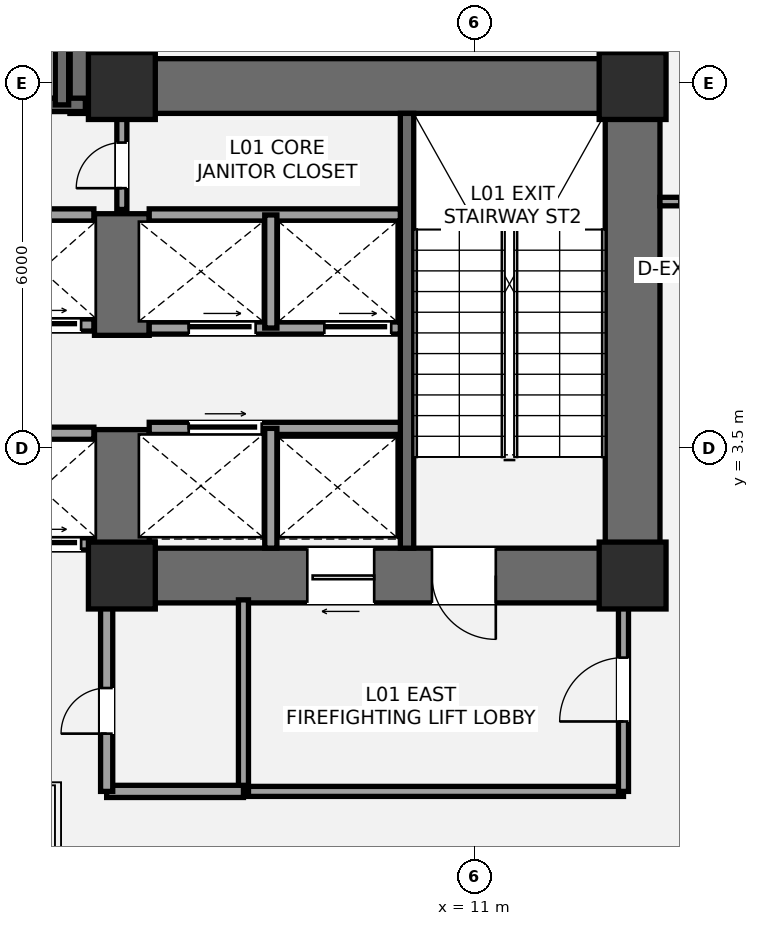
"""IFC4 building model, lengths in metres.
Left out: names, types, materials, properties, quantities, classifications, styles, units other than length and angle.
Written with IfcOpenShell. Run it as: python <this file> out.ifc"""

import sys

from ifc_helpers import new_model, si_unit, direction, frame, frame_2d, origin, origin_2d, place, context, subcontext, project, spatial, rectangle, extrude, element, fill, save


model = new_model("IFC4")
c1 = context("Model", 3, precision=1e-05, world=origin(), true_north=direction((0.0, 1.0)))
c2 = subcontext(c1, "Body", "Model", "MODEL_VIEW")
j1 = project(units=[si_unit("LENGTHUNIT", "METRE"), si_unit("PLANEANGLEUNIT", "RADIAN")], contexts=[c1])
p1 = place(None, origin())
s1 = spatial("IfcSite", under=j1, at=p1, CompositionType="ELEMENT")
p2 = place(p1, origin())
s2 = spatial("IfcBuilding", under=s1, at=p2, CompositionType="ELEMENT")
p3 = place(p2, frame((0.0, 0.0, 6.0)))
s3 = spatial("IfcBuildingStorey", under=s2, at=p3, CompositionType="ELEMENT", Elevation=6.0)
p4 = place(p3, frame((13.6, 0.95, 0.0), z_axis=(0.0, 0.0, 1.0), x_axis=(0.0, 1.0, 0.0)))
e1 = element("IfcWall", 1, at=p4, inside=s3, PredefinedType="SHEAR", context=c2, shape_type="SweptSolid", body=[
    extrude(rectangle(XDim=8.95, YDim=0.9, at=frame_2d((4.475, 0.0))), origin(), (0.0, 0.0, 1.0), 4.2),
])
p5 = place(p3, frame((4.35, 9.45, 0.0), z_axis=(0.0, 0.0, 1.0), x_axis=(1.0, 0.0, 0.0)))
e2 = element("IfcWall", 2, at=p5, inside=s3, PredefinedType="SHEAR", context=c2, shape_type="SweptSolid", body=[
    extrude(rectangle(XDim=9.7, YDim=0.9, at=frame_2d((4.85, 0.0))), origin(), (0.0, 0.0, 1.0), 4.2),
])
p6 = place(p3, frame((14.05, 1.4, 0.0), z_axis=(0.0, 0.0, 1.0), x_axis=(-1.0, 0.0, 0.0)))
e3 = element("IfcWall", 3, at=p6, inside=s3, PredefinedType="SHEAR", context=c2, shape_type="SweptSolid", body=[
    extrude(rectangle(XDim=9.3, YDim=0.9, at=frame_2d((4.65, 0.0))), origin(), (0.0, 0.0, 1.0), 4.2),
])
p7 = place(p6, frame((2.7, 0.0, 0.0)))
e4 = element("IfcOpeningElement", 4, at=p7, cuts=e3, PredefinedType="OPENING", context=c2, shape_type="SweptSolid", body=[
    extrude(rectangle(XDim=1.05, YDim=2.15, at=frame_2d((0.525, 1.075))), frame((0.0, 0.46, 0.0), z_axis=(0.0, -1.0, 0.0), x_axis=(1.0, 0.0, 0.0)), (0.0, 0.0, 1.0), 0.92),
])
p8 = place(p6, frame((4.7, 0.0, 0.0)))
e5 = element("IfcOpeningElement", 5, at=p8, cuts=e3, PredefinedType="OPENING", context=c2, shape_type="SweptSolid", body=[
    extrude(rectangle(XDim=1.1, YDim=2.2, at=frame_2d((0.55, 1.1))), frame((0.0, 0.46, 0.0), z_axis=(0.0, -1.0, 0.0), x_axis=(1.0, 0.0, 0.0)), (0.0, 0.0, 1.0), 0.92),
])
p9 = place(p3, frame((5.2, 0.95, 0.0), z_axis=(0.0, 0.0, 1.0), x_axis=(0.0, 1.0, 0.0)))
e6 = element("IfcWall", 6, at=p9, inside=s3, PredefinedType="SHEAR", context=c2, shape_type="SweptSolid", body=[
    extrude(rectangle(XDim=2.85, YDim=0.9, at=frame_2d((1.425, 0.0))), origin(), (0.0, 0.0, 1.0), 4.2),
])
p10 = place(p3, frame((5.2, 5.35, 0.0), z_axis=(0.0, 0.0, 1.0), x_axis=(0.0, 1.0, 0.0)))
e7 = element("IfcWall", 7, at=p10, inside=s3, PredefinedType="SHEAR", context=c2, shape_type="SweptSolid", body=[
    extrude(rectangle(XDim=2.0, YDim=0.9, at=frame_2d((1.0, 0.0))), origin(), (0.0, 0.0, 1.0), 4.2),
])
p11 = place(p3, frame((9.89, 1.85, 0.0), z_axis=(0.0, 0.0, 1.0), x_axis=(0.0, 1.0, 0.0)))
e8 = element("IfcWall", 8, at=p11, inside=s3, PredefinedType="SHEAR", context=c2, shape_type="SweptSolid", body=[
    extrude(rectangle(XDim=7.15, YDim=0.22, at=frame_2d((3.575, 0.0))), origin(), (0.0, 0.0, 1.0), 4.2),
])
p12 = place(p3, frame((4.8, 9.0, 0.0), z_axis=(0.0, 0.0, 1.0), x_axis=(0.0, 1.0, 0.0)))
e9 = element("IfcWall", 9, at=p12, inside=s3, PredefinedType="SHEAR", context=c2, shape_type="SweptSolid", body=[
    extrude(rectangle(XDim=4.3, YDim=0.9, at=frame_2d((2.15, 0.0))), origin(), (0.0, 0.0, 1.0), 4.2),
])
p13 = place(p3, frame((-4.7, 9.14, 0.0), z_axis=(0.0, 0.0, 1.0), x_axis=(1.0, 0.0, 0.0)))
e10 = element("IfcWall", 10, at=p13, inside=s3, PredefinedType="SHEAR", context=c2, shape_type="SweptSolid", body=[
    extrude(rectangle(XDim=9.3, YDim=0.22, at=frame_2d((4.65, 0.0))), origin(), (0.0, 0.0, 1.0), 4.2),
])
p14 = place(p13, frame((1.15, 0.0, 0.0)))
e11 = element("IfcOpeningElement", 11, at=p14, cuts=e10, PredefinedType="OPENING", context=c2, shape_type="SweptSolid", body=[
    extrude(rectangle(XDim=1.05, YDim=2.15, at=frame_2d((0.525, 1.075))), frame((0.0, 0.12, 0.0), z_axis=(0.0, -1.0, 0.0), x_axis=(1.0, 0.0, 0.0)), (0.0, 0.0, 1.0), 0.24),
])
p15 = place(p3, frame((4.215, 9.14, 0.0), z_axis=(0.0, 0.0, 1.0), x_axis=(0.0, 1.0, 0.0)))
e12 = element("IfcWall", 12, at=p15, inside=s3, PredefinedType="SHEAR", context=c2, shape_type="SweptSolid", body=[
    extrude(rectangle(XDim=3.26, YDim=0.22, at=frame_2d((1.63, 0.0))), origin(), (0.0, 0.0, 1.0), 4.2),
])
for number, where, z_axis, x_axis in (
    (13, (5.2, 1.4, 0.0), (0.0, 0.0, 1.0), (1.0, 0.0, 0.0)),
    (14, (5.2, 9.45, 0.0), (0.0, 0.0, 1.0), (1.0, 0.0, 0.0)),
    (15, (13.6, 1.4, 0.0), (0.0, 0.0, 1.0), (1.0, 0.0, 0.0)),
    (16, (13.6, 9.45, 0.0), (0.0, 0.0, 1.0), (1.0, 0.0, 0.0)),
):
    element("IfcColumn", number, at=place(p3, frame(where, z_axis=z_axis, x_axis=x_axis)), inside=s3, PredefinedType="COLUMN", context=c2, shape_type="SweptSolid", body=[
        extrude(rectangle(XDim=1.1, YDim=1.1, at=origin_2d()), origin(), (0.0, 0.0, 1.0), 4.2),
    ])
p16 = place(p3, frame((7.2, -2.15, 0.0), z_axis=(0.0, 0.0, 1.0), x_axis=(1.0, 0.0, 0.0)))
e17 = element("IfcWall", 17, at=p16, inside=s3, PredefinedType="PARTITIONING", context=c2, shape_type="SweptSolid", body=[
    extrude(rectangle(XDim=6.25, YDim=0.165, at=frame_2d((3.125, 0.0))), origin(), (0.0, 0.0, 1.0), 3.98),
])
p17 = place(p3, frame((7.2, -2.15, 0.0), z_axis=(0.0, 0.0, 1.0), x_axis=(0.0, 1.0, 0.0)))
e18 = element("IfcWall", 18, at=p17, inside=s3, PredefinedType="PARTITIONING", context=c2, shape_type="SweptSolid", body=[
    extrude(rectangle(XDim=3.15, YDim=0.165, at=frame_2d((1.575, 0.0))), origin(), (0.0, 0.0, 1.0), 3.98),
])
p18 = place(p3, frame((13.45, -2.15, 0.0), z_axis=(0.0, 0.0, 1.0), x_axis=(0.0, 1.0, 0.0)))
e19 = element("IfcWall", 19, at=p18, inside=s3, PredefinedType="PARTITIONING", context=c2, shape_type="SweptSolid", body=[
    extrude(rectangle(XDim=3.15, YDim=0.165, at=frame_2d((1.575, 0.0))), origin(), (0.0, 0.0, 1.0), 3.433),
])
p19 = place(p18, frame((1.15, 0.0, 0.0)))
e20 = element("IfcOpeningElement", 20, at=p19, cuts=e19, PredefinedType="OPENING", context=c2, shape_type="SweptSolid", body=[
    extrude(rectangle(XDim=1.05, YDim=2.15, at=frame_2d((0.525, 1.075))), frame((0.0, 0.093, 0.0), z_axis=(0.0, -1.0, 0.0), x_axis=(1.0, 0.0, 0.0)), (0.0, 0.0, 1.0), 0.185),
])
p20 = place(p3, frame((4.95, -2.15, 0.0), z_axis=(0.0, 0.0, 1.0), x_axis=(1.0, 0.0, 0.0)))
e21 = element("IfcWall", 21, at=p20, inside=s3, PredefinedType="SOLIDWALL", context=c2, shape_type="SweptSolid", body=[
    extrude(rectangle(XDim=2.25, YDim=0.2, at=frame_2d((1.125, 0.0))), origin(), (0.0, 0.0, 1.0), 3.98),
])
p21 = place(p3, frame((4.95, -2.15, 0.0), z_axis=(0.0, 0.0, 1.0), x_axis=(0.0, 1.0, 0.0)))
e22 = element("IfcWall", 22, at=p21, inside=s3, PredefinedType="SOLIDWALL", context=c2, shape_type="SweptSolid", body=[
    extrude(rectangle(XDim=3.15, YDim=0.2, at=frame_2d((1.575, 0.0))), origin(), (0.0, 0.0, 1.0), 3.348),
])
p22 = place(p21, frame((0.95, 0.0, 0.0)))
e23 = element("IfcOpeningElement", 23, at=p22, cuts=e22, PredefinedType="OPENING", context=c2, shape_type="SweptSolid", body=[
    extrude(rectangle(XDim=0.75, YDim=2.1, at=frame_2d((0.375, 1.05))), frame((0.0, 0.11, 0.0), z_axis=(0.0, -1.0, 0.0), x_axis=(1.0, 0.0, 0.0)), (0.0, 0.0, 1.0), 0.22),
])
p23 = place(p3, frame((5.65, 3.82, 0.0), z_axis=(0.0, 0.0, 1.0), x_axis=(1.0, 0.0, 0.0)))
e24 = element("IfcWall", 24, at=p23, inside=s3, PredefinedType="SOLIDWALL", context=c2, shape_type="SweptSolid", body=[
    extrude(rectangle(XDim=4.13, YDim=0.2, at=frame_2d((2.065, 0.0))), origin(), (0.0, 0.0, 1.0), 3.98),
])
p24 = place(p23, frame((0.65, 0.0, 0.0)))
e25 = element("IfcOpeningElement", 25, at=p24, cuts=e24, PredefinedType="OPENING", context=c2, shape_type="SweptSolid", body=[
    extrude(rectangle(XDim=1.2, YDim=2.2, at=frame_2d((0.6, 1.1))), frame((0.0, 0.11, 0.0), z_axis=(0.0, -1.0, 0.0), x_axis=(1.0, 0.0, 0.0)), (0.0, 0.0, 1.0), 0.22),
])
p25 = place(p3, frame((7.65, 1.85, 0.0), z_axis=(0.0, 0.0, 1.0), x_axis=(0.0, 1.0, 0.0)))
e26 = element("IfcWall", 26, at=p25, inside=s3, PredefinedType="SOLIDWALL", context=c2, shape_type="SweptSolid", body=[
    extrude(rectangle(XDim=1.97, YDim=0.2, at=frame_2d((0.985, 0.0))), origin(), (0.0, 0.0, 1.0), 3.98),
])
p26 = place(p3, frame((5.65, 5.47, 0.0), z_axis=(0.0, 0.0, 1.0), x_axis=(1.0, 0.0, 0.0)))
e27 = element("IfcWall", 27, at=p26, inside=s3, PredefinedType="SOLIDWALL", context=c2, shape_type="SweptSolid", body=[
    extrude(rectangle(XDim=4.13, YDim=0.2, at=frame_2d((2.065, 0.0))), origin(), (0.0, 0.0, 1.0), 3.98),
])
p27 = place(p26, frame((0.65, 0.0, 0.0)))
e28 = element("IfcOpeningElement", 28, at=p27, cuts=e27, PredefinedType="OPENING", context=c2, shape_type="SweptSolid", body=[
    extrude(rectangle(XDim=1.1, YDim=2.2, at=frame_2d((0.55, 1.1))), frame((0.0, 0.11, 0.0), z_axis=(0.0, -1.0, 0.0), x_axis=(1.0, 0.0, 0.0)), (0.0, 0.0, 1.0), 0.22),
])
p28 = place(p26, frame((2.88, 0.0, 0.0)))
e29 = element("IfcOpeningElement", 29, at=p28, cuts=e27, PredefinedType="OPENING", context=c2, shape_type="SweptSolid", body=[
    extrude(rectangle(XDim=1.1, YDim=2.2, at=frame_2d((0.55, 1.1))), frame((0.0, 0.11, 0.0), z_axis=(0.0, -1.0, 0.0), x_axis=(1.0, 0.0, 0.0)), (0.0, 0.0, 1.0), 0.22),
])
p29 = place(p3, frame((5.65, 7.33, 0.0), z_axis=(0.0, 0.0, 1.0), x_axis=(1.0, 0.0, 0.0)))
e30 = element("IfcWall", 30, at=p29, inside=s3, PredefinedType="SOLIDWALL", context=c2, shape_type="SweptSolid", body=[
    extrude(rectangle(XDim=4.13, YDim=0.2, at=frame_2d((2.065, 0.0))), origin(), (0.0, 0.0, 1.0), 3.98),
])
p30 = place(p3, frame((7.65, 5.47, 0.0), z_axis=(0.0, 0.0, 1.0), x_axis=(0.0, 1.0, 0.0)))
e31 = element("IfcWall", 31, at=p30, inside=s3, PredefinedType="SOLIDWALL", context=c2, shape_type="SweptSolid", body=[
    extrude(rectangle(XDim=1.86, YDim=0.2, at=frame_2d((0.93, 0.0))), origin(), (0.0, 0.0, 1.0), 3.98),
])
p31 = place(p3, frame((0.88, 1.92, 0.0), z_axis=(0.0, 0.0, 1.0), x_axis=(1.0, 0.0, 0.0)))
e32 = element("IfcWall", 32, at=p31, inside=s3, PredefinedType="SOLIDWALL", context=c2, shape_type="SweptSolid", body=[
    extrude(rectangle(XDim=3.86, YDim=0.2, at=frame_2d((1.93, 0.0))), origin(), (0.0, 0.0, 1.0), 2.97),
])
p32 = place(p31, frame((0.55, 0.0, 0.0)))
e33 = element("IfcOpeningElement", 33, at=p32, cuts=e32, PredefinedType="OPENING", context=c2, shape_type="SweptSolid", body=[
    extrude(rectangle(XDim=1.1, YDim=2.2, at=frame_2d((0.55, 1.1))), frame((0.0, 0.11, 0.0), z_axis=(0.0, -1.0, 0.0), x_axis=(1.0, 0.0, 0.0)), (0.0, 0.0, 1.0), 0.22),
])
p33 = place(p31, frame((2.55, 0.0, 0.0)))
e34 = element("IfcOpeningElement", 34, at=p33, cuts=e32, PredefinedType="OPENING", context=c2, shape_type="SweptSolid", body=[
    extrude(rectangle(XDim=1.1, YDim=2.2, at=frame_2d((0.55, 1.1))), frame((0.0, 0.11, 0.0), z_axis=(0.0, -1.0, 0.0), x_axis=(1.0, 0.0, 0.0)), (0.0, 0.0, 1.0), 0.22),
])
p34 = place(p3, frame((0.88, 3.74, 0.0), z_axis=(0.0, 0.0, 1.0), x_axis=(1.0, 0.0, 0.0)))
e35 = element("IfcWall", 35, at=p34, inside=s3, PredefinedType="SOLIDWALL", context=c2, shape_type="SweptSolid", body=[
    extrude(rectangle(XDim=3.86, YDim=0.2, at=frame_2d((1.93, 0.0))), origin(), (0.0, 0.0, 1.0), 3.98),
])
p35 = place(p3, frame((0.88, 5.52, 0.0), z_axis=(0.0, 0.0, 1.0), x_axis=(1.0, 0.0, 0.0)))
e36 = element("IfcWall", 36, at=p35, inside=s3, PredefinedType="SOLIDWALL", context=c2, shape_type="SweptSolid", body=[
    extrude(rectangle(XDim=3.86, YDim=0.2, at=frame_2d((1.93, 0.0))), origin(), (0.0, 0.0, 1.0), 3.98),
])
p36 = place(p35, frame((0.55, 0.0, 0.0)))
e37 = element("IfcOpeningElement", 37, at=p36, cuts=e36, PredefinedType="OPENING", context=c2, shape_type="SweptSolid", body=[
    extrude(rectangle(XDim=1.1, YDim=2.2, at=frame_2d((0.55, 1.1))), frame((0.0, 0.11, 0.0), z_axis=(0.0, -1.0, 0.0), x_axis=(1.0, 0.0, 0.0)), (0.0, 0.0, 1.0), 0.22),
])
p37 = place(p35, frame((2.55, 0.0, 0.0)))
e38 = element("IfcOpeningElement", 38, at=p37, cuts=e36, PredefinedType="OPENING", context=c2, shape_type="SweptSolid", body=[
    extrude(rectangle(XDim=1.1, YDim=2.2, at=frame_2d((0.55, 1.1))), frame((0.0, 0.11, 0.0), z_axis=(0.0, -1.0, 0.0), x_axis=(1.0, 0.0, 0.0)), (0.0, 0.0, 1.0), 0.22),
])
p38 = place(p3, frame((0.88, 7.33, 0.0), z_axis=(0.0, 0.0, 1.0), x_axis=(1.0, 0.0, 0.0)))
e39 = element("IfcWall", 39, at=p38, inside=s3, PredefinedType="SOLIDWALL", context=c2, shape_type="SweptSolid", body=[
    extrude(rectangle(XDim=3.86, YDim=0.2, at=frame_2d((1.93, 0.0))), origin(), (0.0, 0.0, 1.0), 3.98),
])
p39 = place(p3, frame((5.2, 7.42, 0.0), z_axis=(0.0, 0.0, 1.0), x_axis=(0.0, 1.0, 0.0)))
e40 = element("IfcWall", 40, at=p39, inside=s3, PredefinedType="PARTITIONING", context=c2, shape_type="SweptSolid", body=[
    extrude(rectangle(XDim=1.58, YDim=0.165, at=frame_2d((0.79, 0.0))), origin(), (0.0, 0.0, 1.0), 3.98),
])
p40 = place(p39, frame((0.35, 0.0, 0.0)))
e41 = element("IfcOpeningElement", 41, at=p40, cuts=e40, PredefinedType="OPENING", context=c2, shape_type="SweptSolid", body=[
    extrude(rectangle(XDim=0.75, YDim=2.1, at=frame_2d((0.375, 1.05))), frame((0.0, 0.093, 0.0), z_axis=(0.0, -1.0, 0.0), x_axis=(1.0, 0.0, 0.0)), (0.0, 0.0, 1.0), 0.185),
])
p41 = place(p3, frame((14.05, 7.55, 0.0), z_axis=(0.0, 0.0, 1.0), x_axis=(1.0, 0.0, 0.0)))
e42 = element("IfcWall", 42, at=p41, inside=s3, PredefinedType="PARTITIONING", context=c2, shape_type="SweptSolid", body=[
    extrude(rectangle(XDim=2.35, YDim=0.14, at=frame_2d((1.175, 0.0))), origin(), (0.0, 0.0, 1.0), 3.433),
])
p42 = place(p41, frame((0.32, 0.0, 0.0)))
e43 = element("IfcOpeningElement", 43, at=p42, cuts=e42, PredefinedType="OPENING", context=c2, shape_type="SweptSolid", body=[
    extrude(rectangle(XDim=0.92, YDim=2.15, at=frame_2d((0.46, 1.075))), frame((0.0, 0.08, 0.0), z_axis=(0.0, -1.0, 0.0), x_axis=(1.0, 0.0, 0.0)), (0.0, 0.0, 1.0), 0.16),
])
p43 = place(p7, origin())
e44 = element("IfcDoor", 44, at=p43, inside=s3, OperationType="SINGLE_SWING_LEFT", PredefinedType="DOOR", context=c2, shape_type="SweptSolid", body=[
    extrude(rectangle(XDim=1.05, YDim=2.15, at=frame_2d((0.525, 1.075))), frame((0.0, 0.025, 0.0), z_axis=(0.0, -1.0, 0.0), x_axis=(1.0, 0.0, 0.0)), (0.0, 0.0, 1.0), 0.05),
])
fill(e4, e44)
p44 = place(p19, origin())
e45 = element("IfcDoor", 45, at=p44, inside=s3, OperationType="SINGLE_SWING_LEFT", PredefinedType="DOOR", context=c2, shape_type="SweptSolid", body=[
    extrude(rectangle(XDim=1.05, YDim=2.15, at=frame_2d((0.525, 1.075))), frame((0.0, 0.025, 0.0), z_axis=(0.0, -1.0, 0.0), x_axis=(1.0, 0.0, 0.0)), (0.0, 0.0, 1.0), 0.05),
])
fill(e20, e45)
p45 = place(p22, origin())
e46 = element("IfcDoor", 46, at=p45, inside=s3, OperationType="SINGLE_SWING_LEFT", PredefinedType="DOOR", context=c2, shape_type="SweptSolid", body=[
    extrude(rectangle(XDim=0.75, YDim=2.1, at=frame_2d((0.375, 1.05))), frame((0.0, 0.025, 0.0), z_axis=(0.0, -1.0, 0.0), x_axis=(1.0, 0.0, 0.0)), (0.0, 0.0, 1.0), 0.05),
])
fill(e23, e46)
p46 = place(p8, origin())
e47 = element("IfcDoor", 47, at=p46, inside=s3, OperationType="SLIDING_TO_LEFT", PredefinedType="DOOR", context=c2, shape_type="SweptSolid", body=[
    extrude(rectangle(XDim=1.1, YDim=2.2, at=frame_2d((0.55, 1.1))), frame((0.0, 0.025, 0.0), z_axis=(0.0, -1.0, 0.0), x_axis=(1.0, 0.0, 0.0)), (0.0, 0.0, 1.0), 0.05),
])
fill(e5, e47)
p47 = place(p24, origin())
e48 = element("IfcDoor", 48, at=p47, inside=s3, OperationType="SLIDING_TO_RIGHT", PredefinedType="DOOR", context=c2, shape_type="SweptSolid", body=[
    extrude(rectangle(XDim=1.2, YDim=2.2, at=frame_2d((0.6, 1.1))), frame((0.0, 0.025, 0.0), z_axis=(0.0, -1.0, 0.0), x_axis=(1.0, 0.0, 0.0)), (0.0, 0.0, 1.0), 0.05),
])
fill(e25, e48)
p48 = place(p27, origin())
e49 = element("IfcDoor", 49, at=p48, inside=s3, OperationType="SLIDING_TO_LEFT", PredefinedType="DOOR", context=c2, shape_type="SweptSolid", body=[
    extrude(rectangle(XDim=1.1, YDim=2.2, at=frame_2d((0.55, 1.1))), frame((0.0, 0.025, 0.0), z_axis=(0.0, -1.0, 0.0), x_axis=(1.0, 0.0, 0.0)), (0.0, 0.0, 1.0), 0.05),
])
fill(e28, e49)
p49 = place(p28, origin())
e50 = element("IfcDoor", 50, at=p49, inside=s3, OperationType="SLIDING_TO_LEFT", PredefinedType="DOOR", context=c2, shape_type="SweptSolid", body=[
    extrude(rectangle(XDim=1.1, YDim=2.2, at=frame_2d((0.55, 1.1))), frame((0.0, 0.025, 0.0), z_axis=(0.0, -1.0, 0.0), x_axis=(1.0, 0.0, 0.0)), (0.0, 0.0, 1.0), 0.05),
])
fill(e29, e50)
p50 = place(p33, origin())
e51 = element("IfcDoor", 51, at=p50, inside=s3, OperationType="SLIDING_TO_LEFT", PredefinedType="DOOR", context=c2, shape_type="SweptSolid", body=[
    extrude(rectangle(XDim=1.1, YDim=2.2, at=frame_2d((0.55, 1.1))), frame((0.0, 0.025, 0.0), z_axis=(0.0, -1.0, 0.0), x_axis=(1.0, 0.0, 0.0)), (0.0, 0.0, 1.0), 0.05),
])
fill(e34, e51)
p51 = place(p37, origin())
e52 = element("IfcDoor", 52, at=p51, inside=s3, OperationType="SLIDING_TO_LEFT", PredefinedType="DOOR", context=c2, shape_type="SweptSolid", body=[
    extrude(rectangle(XDim=1.1, YDim=2.2, at=frame_2d((0.55, 1.1))), frame((0.0, 0.025, 0.0), z_axis=(0.0, -1.0, 0.0), x_axis=(1.0, 0.0, 0.0)), (0.0, 0.0, 1.0), 0.05),
])
fill(e38, e52)
p52 = place(p40, origin())
e53 = element("IfcDoor", 53, at=p52, inside=s3, OperationType="SINGLE_SWING_LEFT", PredefinedType="DOOR", context=c2, shape_type="SweptSolid", body=[
    extrude(rectangle(XDim=0.75, YDim=2.1, at=frame_2d((0.375, 1.05))), frame((0.0, 0.025, 0.0), z_axis=(0.0, -1.0, 0.0), x_axis=(1.0, 0.0, 0.0)), (0.0, 0.0, 1.0), 0.05),
])
fill(e41, e53)
save(model, sys.argv[1])
